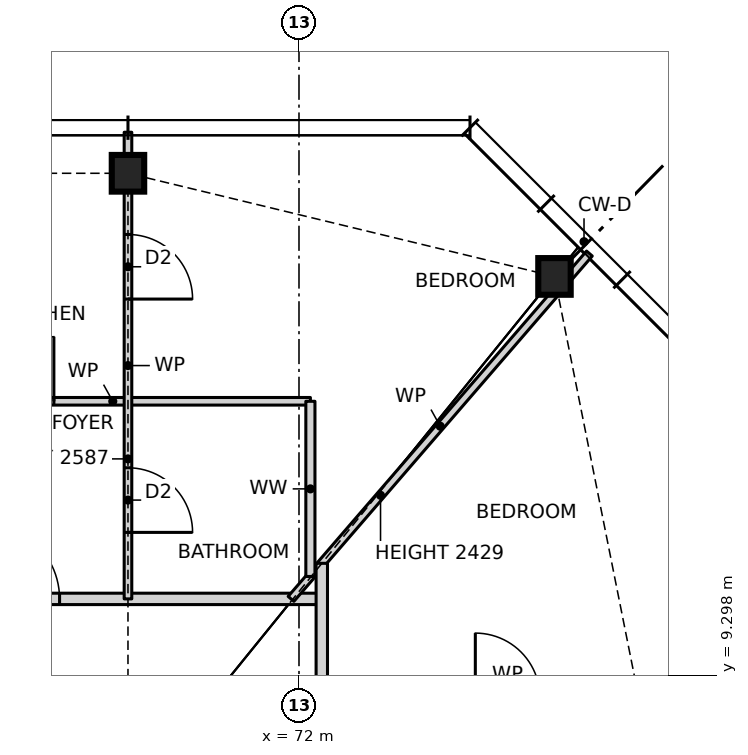
"""IFC4 building model, lengths in metres.
Left out: names, types, materials, properties, quantities, classifications, styles, units other than length and angle.
Written with IfcOpenShell. Run it as: python <this file> out.ifc"""

import sys

from ifc_helpers import new_model, si_unit, direction, frame, frame_2d, origin, origin_2d, place, context, subcontext, project, spatial, rectangle, i_section, extrude, element, fill, save


model = new_model("IFC4")
c1 = context("Model", 3, precision=1e-05, world=origin(), true_north=direction((0.0, 1.0)))
c2 = subcontext(c1, "Body", "Model", "MODEL_VIEW")
j1 = project(units=[si_unit("LENGTHUNIT", "METRE"), si_unit("PLANEANGLEUNIT", "RADIAN")], contexts=[c1])
p1 = place(None, origin())
s1 = spatial("IfcSite", under=j1, at=p1, CompositionType="ELEMENT")
p2 = place(p1, origin())
s2 = spatial("IfcBuilding", under=s1, at=p2, CompositionType="ELEMENT")
p3 = place(p2, frame((0.0, 0.0, 91.0)))
s3 = spatial("IfcBuildingStorey", under=s2, at=p3, CompositionType="ELEMENT", Elevation=91.0)
for number, where, z_axis, x_axis in (
    (1, (75.361, 14.543, 0.0), (0.0, 0.0, 1.0), (1.0, 0.0, 0.0)),
    (2, (69.75, 15.9, 0.0), (0.0, 0.0, 1.0), (1.0, 0.0, 0.0)),
):
    element("IfcColumn", number, at=place(p3, frame(where, z_axis=z_axis, x_axis=x_axis)), inside=s3, PredefinedType="COLUMN", context=c2, shape_type="SweptSolid", body=[
        extrude(i_section(OverallWidth=0.427, OverallDepth=0.483, WebThickness=0.051, FlangeThickness=0.082, at=origin_2d()), origin(), (0.0, 0.0, 1.0), 3.5),
    ])
p4 = place(p3, frame((53.7, 10.3, 0.0), z_axis=(0.0, 0.0, 1.0), x_axis=(1.0, 0.0, 0.0)))
e3 = element("IfcWall", 3, at=p4, inside=s3, PredefinedType="PARTITIONING", context=c2, shape_type="SweptSolid", body=[
    extrude(rectangle(XDim=18.6, YDim=0.15, at=frame_2d((9.3, 0.0))), origin(), (0.0, 0.0, 1.0), 3.27),
])
p5 = place(p4, frame((14.15, 0.0, 0.0)))
e4 = element("IfcOpeningElement", 4, at=p5, cuts=e3, PredefinedType="OPENING", context=c2, shape_type="SweptSolid", body=[
    extrude(rectangle(XDim=1.0, YDim=2.1, at=frame_2d((0.5, 1.05))), frame((0.0, 0.085, 0.0), z_axis=(0.0, -1.0, 0.0), x_axis=(1.0, 0.0, 0.0)), (0.0, 0.0, 1.0), 0.17),
])
p6 = place(p4, frame((9.925, 0.0, 0.0)))
e5 = element("IfcOpeningElement", 5, at=p6, cuts=e3, PredefinedType="OPENING", context=c2, shape_type="SweptSolid", body=[
    extrude(rectangle(XDim=1.0, YDim=2.1, at=frame_2d((0.5, 1.05))), frame((0.0, 0.085, 0.0), z_axis=(0.0, -1.0, 0.0), x_axis=(1.0, 0.0, 0.0)), (0.0, 0.0, 1.0), 0.17),
])
p7 = place(p4, frame((5.15, 0.0, 0.0)))
e6 = element("IfcOpeningElement", 6, at=p7, cuts=e3, PredefinedType="OPENING", context=c2, shape_type="SweptSolid", body=[
    extrude(rectangle(XDim=1.0, YDim=2.1, at=frame_2d((0.5, 1.05))), frame((0.0, 0.085, 0.0), z_axis=(0.0, -1.0, 0.0), x_axis=(1.0, 0.0, 0.0)), (0.0, 0.0, 1.0), 0.17),
])
p8 = place(p3, frame((66.95, 12.9, 0.0), z_axis=(0.0, 0.0, 1.0), x_axis=(1.0, 0.0, 0.0)))
e7 = element("IfcWall", 7, at=p8, inside=s3, PredefinedType="PARTITIONING", context=c2, shape_type="SweptSolid", body=[
    extrude(rectangle(XDim=5.2, YDim=0.1, at=frame_2d((2.6, 0.0))), origin(), (0.0, 0.0, 1.0), 3.27),
])
p9 = place(p8, frame((0.975, 0.0, 0.0)))
e8 = element("IfcOpeningElement", 8, at=p9, cuts=e7, PredefinedType="OPENING", context=c2, shape_type="SweptSolid", body=[
    extrude(rectangle(XDim=0.85, YDim=2.1, at=frame_2d((0.425, 1.05))), frame((0.0, 0.06, 0.0), z_axis=(0.0, -1.0, 0.0), x_axis=(1.0, 0.0, 0.0)), (0.0, 0.0, 1.0), 0.12),
])
p10 = place(p3, frame((71.895, 10.3, 0.0), z_axis=(0.0, 0.0, 1.0), x_axis=(0.65378286253, 0.756682211144, 0.0)))
e9 = element("IfcWall", 9, at=p10, inside=s3, PredefinedType="PARTITIONING", context=c2, shape_type="SweptSolid", body=[
    extrude(rectangle(XDim=6.005, YDim=0.1, at=frame_2d((3.002, 0.0))), origin(), (0.0, 0.0, 1.0), 2.429),
])
p11 = place(p3, frame((72.3, -10.768, 0.0), z_axis=(0.0, 0.0, 1.0), x_axis=(0.0, 1.0, 0.0)))
e10 = element("IfcWall", 10, at=p11, inside=s3, PredefinedType="PARTITIONING", context=c2, shape_type="SweptSolid", body=[
    extrude(rectangle(XDim=21.536, YDim=0.15, at=frame_2d((10.768, 0.0))), origin(), (0.0, 0.0, 1.0), 3.27),
])
p12 = place(p11, frame((2.668, 0.0, 0.0)))
e11 = element("IfcOpeningElement", 11, at=p12, cuts=e10, PredefinedType="OPENING", context=c2, shape_type="SweptSolid", body=[
    extrude(rectangle(XDim=1.0, YDim=2.1, at=frame_2d((0.5, 1.05))), frame((0.0, 0.085, 0.0), z_axis=(0.0, -1.0, 0.0), x_axis=(1.0, 0.0, 0.0)), (0.0, 0.0, 1.0), 0.17),
])
p13 = place(p11, frame((6.893, 0.0, 0.0)))
e12 = element("IfcOpeningElement", 12, at=p13, cuts=e10, PredefinedType="OPENING", context=c2, shape_type="SweptSolid", body=[
    extrude(rectangle(XDim=1.0, YDim=2.1, at=frame_2d((0.5, 1.05))), frame((0.0, 0.085, 0.0), z_axis=(0.0, -1.0, 0.0), x_axis=(1.0, 0.0, 0.0)), (0.0, 0.0, 1.0), 0.17),
])
p14 = place(p11, frame((16.168, 0.0, 0.0)))
e13 = element("IfcOpeningElement", 13, at=p14, cuts=e10, PredefinedType="OPENING", context=c2, shape_type="SweptSolid", body=[
    extrude(rectangle(XDim=1.0, YDim=2.1, at=frame_2d((0.5, 1.05))), frame((0.0, 0.085, 0.0), z_axis=(0.0, -1.0, 0.0), x_axis=(1.0, 0.0, 0.0)), (0.0, 0.0, 1.0), 0.17),
])
p15 = place(p3, frame((72.15, 10.595, 0.0), z_axis=(0.0, 0.0, 1.0), x_axis=(0.0, 1.0, 0.0)))
e14 = element("IfcWall", 14, at=p15, inside=s3, PredefinedType="PARTITIONING", context=c2, shape_type="SweptSolid", body=[
    extrude(rectangle(XDim=2.305, YDim=0.12, at=frame_2d((1.152, 0.0))), origin(), (0.0, 0.0, 1.0), 3.27),
])
p16 = place(p3, frame((69.75, 10.3, 0.0), z_axis=(0.0, 0.0, 1.0), x_axis=(0.0, 1.0, 0.0)))
e15 = element("IfcWall", 15, at=p16, inside=s3, PredefinedType="PARTITIONING", context=c2, shape_type="SweptSolid", body=[
    extrude(rectangle(XDim=6.14, YDim=0.1, at=frame_2d((3.07, 0.0))), origin(), (0.0, 0.0, 1.0), 2.587),
])
p17 = place(p16, frame((0.875, 0.0, 0.0)))
e16 = element("IfcOpeningElement", 16, at=p17, cuts=e15, PredefinedType="OPENING", context=c2, shape_type="SweptSolid", body=[
    extrude(rectangle(XDim=0.85, YDim=2.1, at=frame_2d((0.425, 1.05))), frame((0.0, 0.06, 0.0), z_axis=(0.0, -1.0, 0.0), x_axis=(1.0, 0.0, 0.0)), (0.0, 0.0, 1.0), 0.12),
])
p18 = place(p16, frame((3.945, 0.0, 0.0)))
e17 = element("IfcOpeningElement", 17, at=p18, cuts=e15, PredefinedType="OPENING", context=c2, shape_type="SweptSolid", body=[
    extrude(rectangle(XDim=0.85, YDim=2.1, at=frame_2d((0.425, 1.05))), frame((0.0, 0.06, 0.0), z_axis=(0.0, -1.0, 0.0), x_axis=(1.0, 0.0, 0.0)), (0.0, 0.0, 1.0), 0.12),
])
p19 = place(p5, origin())
e18 = element("IfcDoor", 18, at=p19, inside=s3, OperationType="SINGLE_SWING_LEFT", PredefinedType="DOOR", context=c2, shape_type="SweptSolid", body=[
    extrude(rectangle(XDim=1.0, YDim=2.1, at=frame_2d((0.5, 1.05))), frame((0.0, 0.025, 0.0), z_axis=(0.0, -1.0, 0.0), x_axis=(1.0, 0.0, 0.0)), (0.0, 0.0, 1.0), 0.05),
])
fill(e4, e18)
p20 = place(p9, origin())
e19 = element("IfcDoor", 19, at=p20, inside=s3, OperationType="SINGLE_SWING_RIGHT", PredefinedType="DOOR", context=c2, shape_type="SweptSolid", body=[
    extrude(rectangle(XDim=0.85, YDim=2.1, at=frame_2d((0.425, 1.05))), frame((0.0, 0.025, 0.0), z_axis=(0.0, -1.0, 0.0), x_axis=(1.0, 0.0, 0.0)), (0.0, 0.0, 1.0), 0.05),
])
fill(e8, e19)
p21 = place(p17, frame((0.85, 0.0, 0.0), z_axis=(0.0, 0.0, 1.0), x_axis=(-1.0, 0.0, 0.0)))
e20 = element("IfcDoor", 20, at=p21, inside=s3, OperationType="SINGLE_SWING_RIGHT", PredefinedType="DOOR", context=c2, shape_type="SweptSolid", body=[
    extrude(rectangle(XDim=0.85, YDim=2.1, at=frame_2d((0.425, 1.05))), frame((0.0, 0.025, 0.0), z_axis=(0.0, -1.0, 0.0), x_axis=(1.0, 0.0, 0.0)), (0.0, 0.0, 1.0), 0.05),
])
fill(e16, e20)
p22 = place(p18, frame((0.85, 0.0, 0.0), z_axis=(0.0, 0.0, 1.0), x_axis=(-1.0, 0.0, 0.0)))
e21 = element("IfcDoor", 21, at=p22, inside=s3, OperationType="SINGLE_SWING_RIGHT", PredefinedType="DOOR", context=c2, shape_type="SweptSolid", body=[
    extrude(rectangle(XDim=0.85, YDim=2.1, at=frame_2d((0.425, 1.05))), frame((0.0, 0.025, 0.0), z_axis=(0.0, -1.0, 0.0), x_axis=(1.0, 0.0, 0.0)), (0.0, 0.0, 1.0), 0.05),
])
fill(e17, e21)
save(model, sys.argv[1])
